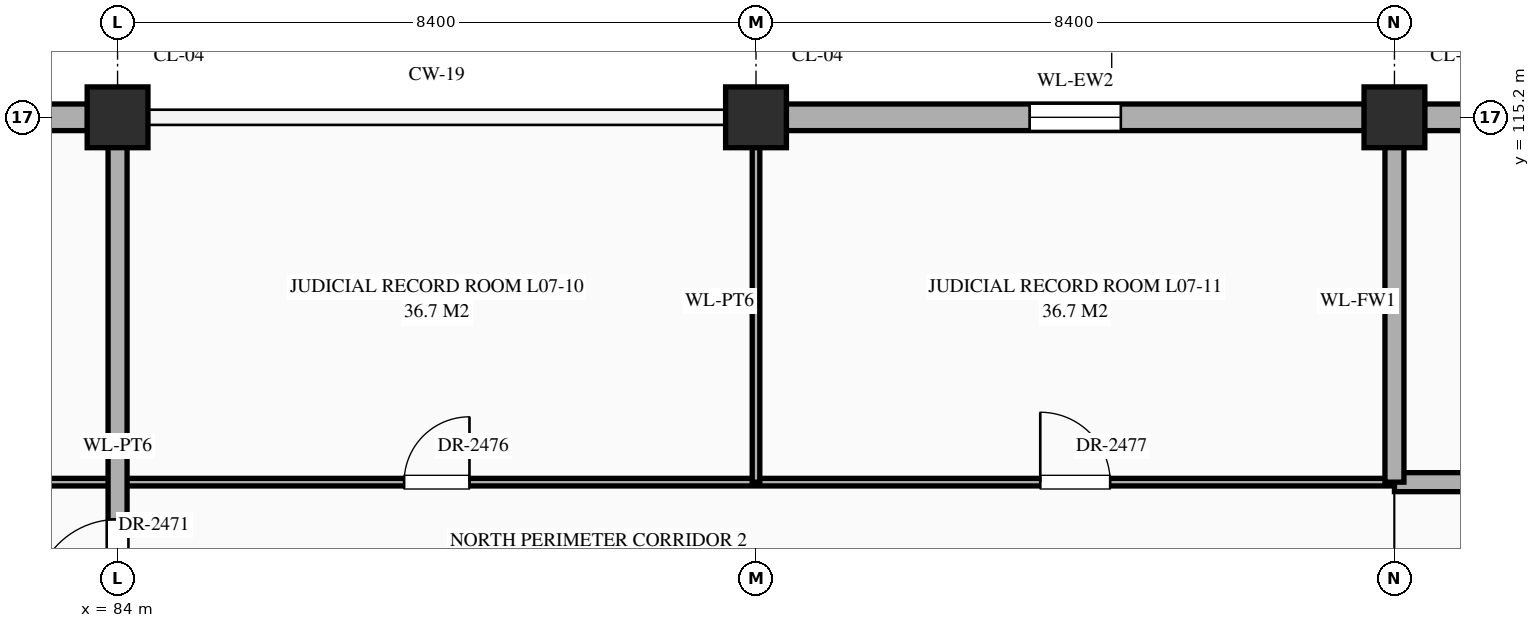
"""IFC4 building model, lengths in metres.
Left out: names, types, materials, properties, quantities, classifications, styles, units other than length and angle.
Written with IfcOpenShell. Run it as: python <this file> out.ifc"""

import sys

from ifc_helpers import new_model, si_unit, direction, frame, frame_2d, origin, origin_2d, place, context, subcontext, project, spatial, rectangle, extrude, element, fill, save


model = new_model("IFC4")
c1 = context("Model", 3, precision=1e-05, world=origin(), true_north=direction((0.0, 1.0)))
c2 = subcontext(c1, "Body", "Model", "MODEL_VIEW")
j1 = project(units=[si_unit("LENGTHUNIT", "METRE"), si_unit("PLANEANGLEUNIT", "RADIAN")], contexts=[c1])
p1 = place(None, origin())
s1 = spatial("IfcSite", under=j1, at=p1, CompositionType="ELEMENT")
p2 = place(p1, origin())
s2 = spatial("IfcBuilding", under=s1, at=p2, CompositionType="ELEMENT")
p3 = place(p2, frame((0.0, 0.0, 30.6)))
s3 = spatial("IfcBuildingStorey", under=s2, at=p3, CompositionType="ELEMENT", Elevation=30.6)
for number, where, z_axis, x_axis in (
    (1, (84.0, 115.2, 0.0), (0.0, 0.0, 1.0), (1.0, 0.0, 0.0)),
    (2, (92.4, 115.2, 0.0), (0.0, 0.0, 1.0), (1.0, 0.0, 0.0)),
    (3, (100.8, 115.2, 0.0), (0.0, 0.0, 1.0), (1.0, 0.0, 0.0)),
):
    element("IfcColumn", number, at=place(p3, frame(where, z_axis=z_axis, x_axis=x_axis)), inside=s3, PredefinedType="COLUMN", context=c2, shape_type="SweptSolid", body=[
        extrude(rectangle(XDim=0.8, YDim=0.8, at=origin_2d()), origin(), (0.0, 0.0, 1.0), 4.5),
    ])
p4 = place(p3, frame((75.995, 115.2, 0.0), z_axis=(0.0, 0.0, 1.0), x_axis=(1.0, 0.0, 0.0)))
e4 = element("IfcWall", 4, at=p4, inside=s3, PredefinedType="STANDARD", context=c2, shape_type="SweptSolid", body=[
    extrude(rectangle(XDim=7.61, YDim=0.35, at=frame_2d((3.805, 0.0))), origin(), (0.0, 0.0, 1.0), 3.59),
])
p5 = place(p4, frame((3.205, 0.0, 0.85)))
e5 = element("IfcOpeningElement", 5, at=p5, cuts=e4, PredefinedType="OPENING", context=c2, shape_type="SweptSolid", body=[
    extrude(rectangle(XDim=1.2, YDim=1.74, at=frame_2d((0.6, 0.87))), frame((0.0, 0.187, 0.0), z_axis=(0.0, -1.0, 0.0), x_axis=(1.0, 0.0, 0.0)), (0.0, 0.0, 1.0), 0.374),
])
p6 = place(p3, frame((92.795, 115.2, 0.0), z_axis=(0.0, 0.0, 1.0), x_axis=(1.0, 0.0, 0.0)))
e6 = element("IfcWall", 6, at=p6, inside=s3, PredefinedType="STANDARD", context=c2, shape_type="SweptSolid", body=[
    extrude(rectangle(XDim=7.61, YDim=0.35, at=frame_2d((3.805, 0.0))), origin(), (0.0, 0.0, 1.0), 3.59),
])
p7 = place(p6, frame((3.205, 0.0, 0.85)))
e7 = element("IfcOpeningElement", 7, at=p7, cuts=e6, PredefinedType="OPENING", context=c2, shape_type="SweptSolid", body=[
    extrude(rectangle(XDim=1.2, YDim=2.12, at=frame_2d((0.6, 1.06))), frame((0.0, 0.187, 0.0), z_axis=(0.0, -1.0, 0.0), x_axis=(1.0, 0.0, 0.0)), (0.0, 0.0, 1.0), 0.374),
])
p8 = place(p3, frame((101.195, 115.2, 0.0), z_axis=(0.0, 0.0, 1.0), x_axis=(1.0, 0.0, 0.0)))
e8 = element("IfcWall", 8, at=p8, inside=s3, PredefinedType="STANDARD", context=c2, shape_type="SweptSolid", body=[
    extrude(rectangle(XDim=7.61, YDim=0.35, at=frame_2d((3.805, 0.0))), origin(), (0.0, 0.0, 1.0), 3.59),
])
p9 = place(p3, frame((67.2, 110.4, 0.0), z_axis=(0.0, 0.0, 1.0), x_axis=(1.0, 0.0, 0.0)))
e9 = element("IfcWall", 9, at=p9, inside=s3, PredefinedType="STANDARD", context=c2, shape_type="SweptSolid", body=[
    extrude(rectangle(XDim=33.6, YDim=0.1, at=frame_2d((16.8, 0.0))), origin(), (0.0, 0.0, 1.0), 4.24),
])
p10 = place(p9, frame((3.63, 0.0, 0.0)))
e10 = element("IfcOpeningElement", 10, at=p10, cuts=e9, PredefinedType="OPENING", context=c2, shape_type="SweptSolid", body=[
    extrude(rectangle(XDim=1.14, YDim=2.4, at=frame_2d((0.57, 1.2))), frame((0.0, 0.062, 0.0), z_axis=(0.0, -1.0, 0.0), x_axis=(1.0, 0.0, 0.0)), (0.0, 0.0, 1.0), 0.124),
])
p11 = place(p9, frame((12.15, 0.0, 0.0)))
e11 = element("IfcOpeningElement", 11, at=p11, cuts=e9, PredefinedType="OPENING", context=c2, shape_type="SweptSolid", body=[
    extrude(rectangle(XDim=0.9, YDim=2.15, at=frame_2d((0.45, 1.075))), frame((0.0, 0.062, 0.0), z_axis=(0.0, -1.0, 0.0), x_axis=(1.0, 0.0, 0.0)), (0.0, 0.0, 1.0), 0.124),
])
p12 = place(p9, frame((20.57, 0.0, 0.0)))
e12 = element("IfcOpeningElement", 12, at=p12, cuts=e9, PredefinedType="OPENING", context=c2, shape_type="SweptSolid", body=[
    extrude(rectangle(XDim=0.86, YDim=2.1, at=frame_2d((0.43, 1.05))), frame((0.0, 0.062, 0.0), z_axis=(0.0, -1.0, 0.0), x_axis=(1.0, 0.0, 0.0)), (0.0, 0.0, 1.0), 0.124),
])
p13 = place(p9, frame((28.94, 0.0, 0.0)))
e13 = element("IfcOpeningElement", 13, at=p13, cuts=e9, PredefinedType="OPENING", context=c2, shape_type="SweptSolid", body=[
    extrude(rectangle(XDim=0.92, YDim=2.15, at=frame_2d((0.46, 1.075))), frame((0.0, 0.062, 0.0), z_axis=(0.0, -1.0, 0.0), x_axis=(1.0, 0.0, 0.0)), (0.0, 0.0, 1.0), 0.124),
])
p14 = place(p3, frame((100.8, 110.4, 0.0), z_axis=(0.0, 0.0, 1.0), x_axis=(1.0, 0.0, 0.0)))
e14 = element("IfcWall", 14, at=p14, inside=s3, PredefinedType="STANDARD", context=c2, shape_type="SweptSolid", body=[
    extrude(rectangle(XDim=8.4, YDim=0.25, at=frame_2d((4.2, 0.0))), origin(), (0.0, 0.0, 1.0), 4.24),
])
p15 = place(p14, frame((3.7, 0.0, 0.0)))
e15 = element("IfcOpeningElement", 15, at=p15, cuts=e14, PredefinedType="OPENING", context=c2, shape_type="SweptSolid", body=[
    extrude(rectangle(XDim=1.0, YDim=2.2, at=frame_2d((0.5, 1.1))), frame((0.0, 0.137, 0.0), z_axis=(0.0, -1.0, 0.0), x_axis=(1.0, 0.0, 0.0)), (0.0, 0.0, 1.0), 0.274),
])
p16 = place(p3, frame((84.0, 79.24, 0.0), z_axis=(0.0, 0.0, 1.0), x_axis=(0.0, 1.0, 0.0)))
e16 = element("IfcWall", 16, at=p16, inside=s3, PredefinedType="STANDARD", context=c2, shape_type="SweptSolid", body=[
    extrude(rectangle(XDim=35.92, YDim=0.25, at=frame_2d((17.96, 0.0))), origin(), (0.0, 0.0, 1.0), 3.49),
])
p17 = place(p16, frame((22.77, 0.0, 0.0)))
e17 = element("IfcOpeningElement", 17, at=p17, cuts=e16, PredefinedType="OPENING", context=c2, shape_type="SweptSolid", body=[
    extrude(rectangle(XDim=1.5, YDim=2.25, at=frame_2d((0.75, 1.125))), frame((0.0, 0.137, 0.0), z_axis=(0.0, -1.0, 0.0), x_axis=(1.0, 0.0, 0.0)), (0.0, 0.0, 1.0), 0.274),
])
p18 = place(p16, frame((12.525, 0.0, 0.0)))
e18 = element("IfcOpeningElement", 18, at=p18, cuts=e16, PredefinedType="OPENING", context=c2, shape_type="SweptSolid", body=[
    extrude(rectangle(XDim=0.95, YDim=2.15, at=frame_2d((0.475, 1.075))), frame((0.0, 0.137, 0.0), z_axis=(0.0, -1.0, 0.0), x_axis=(1.0, 0.0, 0.0)), (0.0, 0.0, 1.0), 0.274),
])
p19 = place(p16, frame((15.22, 0.0, 0.0)))
e19 = element("IfcOpeningElement", 19, at=p19, cuts=e16, PredefinedType="OPENING", context=c2, shape_type="SweptSolid", body=[
    extrude(rectangle(XDim=1.0, YDim=2.2, at=frame_2d((0.5, 1.1))), frame((0.0, 0.137, 0.0), z_axis=(0.0, -1.0, 0.0), x_axis=(1.0, 0.0, 0.0)), (0.0, 0.0, 1.0), 0.274),
])
p20 = place(p16, frame((25.8, 0.0, 0.0)))
e20 = element("IfcOpeningElement", 20, at=p20, cuts=e16, PredefinedType="OPENING", context=c2, shape_type="SweptSolid", body=[
    extrude(rectangle(XDim=2.0, YDim=2.4, at=frame_2d((1.0, 1.2))), frame((0.0, 0.137, 0.0), z_axis=(0.0, -1.0, 0.0), x_axis=(1.0, 0.0, 0.0)), (0.0, 0.0, 1.0), 0.274),
])
p21 = place(p16, frame((29.57, 0.0, 0.0)))
e21 = element("IfcOpeningElement", 21, at=p21, cuts=e16, PredefinedType="OPENING", context=c2, shape_type="SweptSolid", body=[
    extrude(rectangle(XDim=1.1, YDim=2.2, at=frame_2d((0.55, 1.1))), frame((0.0, 0.137, 0.0), z_axis=(0.0, -1.0, 0.0), x_axis=(1.0, 0.0, 0.0)), (0.0, 0.0, 1.0), 0.274),
])
p22 = place(p16, frame((5.25, 0.0, 0.0)))
e22 = element("IfcOpeningElement", 22, at=p22, cuts=e16, PredefinedType="OPENING", context=c2, shape_type="SweptSolid", body=[
    extrude(rectangle(XDim=1.1, YDim=2.2, at=frame_2d((0.55, 1.1))), frame((0.0, 0.137, 0.0), z_axis=(0.0, -1.0, 0.0), x_axis=(1.0, 0.0, 0.0)), (0.0, 0.0, 1.0), 0.274),
])
p23 = place(p3, frame((92.4, 110.4, 0.0), z_axis=(0.0, 0.0, 1.0), x_axis=(0.0, 1.0, 0.0)))
e23 = element("IfcWall", 23, at=p23, inside=s3, PredefinedType="STANDARD", context=c2, shape_type="SweptSolid", body=[
    extrude(rectangle(XDim=4.76, YDim=0.1, at=frame_2d((2.38, 0.0))), origin(), (0.0, 0.0, 1.0), 3.49),
])
p24 = place(p3, frame((100.8, 110.4, 0.0), z_axis=(0.0, 0.0, 1.0), x_axis=(0.0, 1.0, 0.0)))
e24 = element("IfcWall", 24, at=p24, inside=s3, PredefinedType="STANDARD", context=c2, shape_type="SweptSolid", body=[
    extrude(rectangle(XDim=4.76, YDim=0.25, at=frame_2d((2.38, 0.0))), origin(), (0.0, 0.0, 1.0), 3.49),
])
p25 = place(p7, origin())
e25 = element("IfcWindow", 25, at=p25, inside=s3, PartitioningType="SINGLE_PANEL", PredefinedType="WINDOW", context=c2, shape_type="SweptSolid", body=[
    extrude(rectangle(XDim=1.2, YDim=2.12, at=frame_2d((0.6, 1.06))), frame((0.0, 0.03, 0.0), z_axis=(0.0, -1.0, 0.0), x_axis=(1.0, 0.0, 0.0)), (0.0, 0.0, 1.0), 0.06),
])
fill(e7, e25)
p26 = place(p21, origin())
e26 = element("IfcDoor", 26, at=p26, inside=s3, OperationType="SINGLE_SWING_LEFT", PredefinedType="DOOR", context=c2, shape_type="SweptSolid", body=[
    extrude(rectangle(XDim=1.1, YDim=2.2, at=frame_2d((0.55, 1.1))), frame((0.0, 0.025, 0.0), z_axis=(0.0, -1.0, 0.0), x_axis=(1.0, 0.0, 0.0)), (0.0, 0.0, 1.0), 0.05),
])
fill(e21, e26)
p27 = place(p12, origin())
e27 = element("IfcDoor", 27, at=p27, inside=s3, OperationType="SINGLE_SWING_RIGHT", PredefinedType="DOOR", context=c2, shape_type="SweptSolid", body=[
    extrude(rectangle(XDim=0.86, YDim=2.1, at=frame_2d((0.43, 1.05))), frame((0.0, 0.025, 0.0), z_axis=(0.0, -1.0, 0.0), x_axis=(1.0, 0.0, 0.0)), (0.0, 0.0, 1.0), 0.05),
])
fill(e12, e27)
p28 = place(p13, origin())
e28 = element("IfcDoor", 28, at=p28, inside=s3, OperationType="SINGLE_SWING_LEFT", PredefinedType="DOOR", context=c2, shape_type="SweptSolid", body=[
    extrude(rectangle(XDim=0.92, YDim=2.15, at=frame_2d((0.46, 1.075))), frame((0.0, 0.025, 0.0), z_axis=(0.0, -1.0, 0.0), x_axis=(1.0, 0.0, 0.0)), (0.0, 0.0, 1.0), 0.05),
])
fill(e13, e28)
save(model, sys.argv[1])
